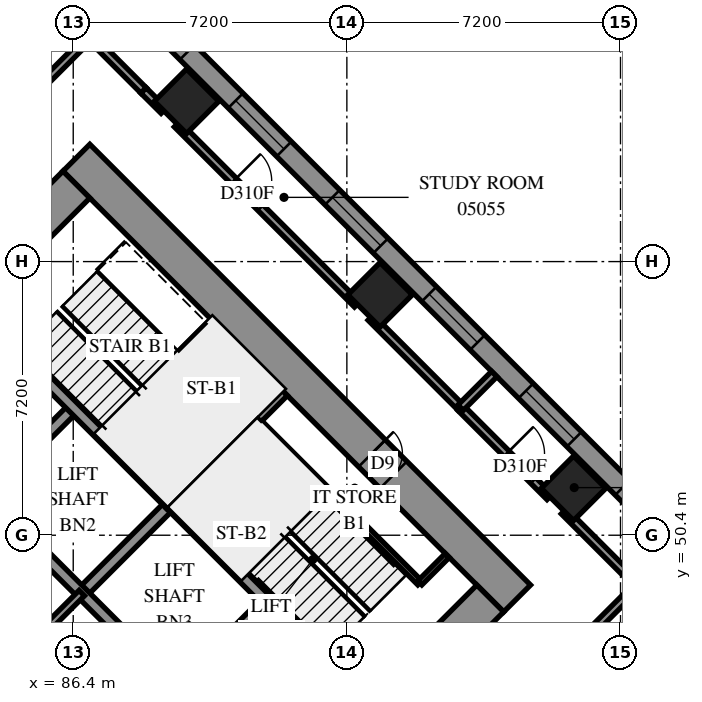
"""IFC4 building model, lengths in metres.
Left out: names, types, materials, properties, quantities, classifications, styles, units other than length and angle.
Written with IfcOpenShell. Run it as: python <this file> out.ifc"""

import sys

from ifc_helpers import new_model, si_unit, direction, frame, frame_2d, origin, origin_2d, place, context, subcontext, project, spatial, polyline, rectangle, outline, extrude, element, fill, save


model = new_model("IFC4")
c1 = context("Model", 3, precision=1e-05, world=origin(), true_north=direction((0.0, 1.0)))
c2 = subcontext(c1, "Body", "Model", "MODEL_VIEW")
j1 = project(units=[si_unit("LENGTHUNIT", "METRE"), si_unit("PLANEANGLEUNIT", "RADIAN")], contexts=[c1])
p1 = place(None, origin())
s1 = spatial("IfcSite", under=j1, at=p1, CompositionType="ELEMENT")
p2 = place(p1, origin())
s2 = spatial("IfcBuilding", under=s1, at=p2, CompositionType="ELEMENT")
p3 = place(p2, frame((0.0, 0.0, 22.8)))
s3 = spatial("IfcBuildingStorey", under=s2, at=p3, CompositionType="ELEMENT", Elevation=22.8)
for number, where, z_axis, x_axis in (
    (1, (89.382, 61.818, 0.0), (0.0, 0.0, 1.0), (0.707, -0.707, 0.0)),
    (2, (94.474, 56.727, 0.0), (0.0, 0.0, 1.0), (0.707, -0.707, 0.0)),
    (3, (99.565, 51.635, 0.0), (0.0, 0.0, 1.0), (0.707, -0.707, 0.0)),
):
    element("IfcColumn", number, at=place(p3, frame(where, z_axis=z_axis, x_axis=x_axis)), inside=s3, PredefinedType="COLUMN", context=c2, shape_type="SweptSolid", body=[
        extrude(rectangle(XDim=1.2, YDim=1.2, at=origin_2d()), origin(), (0.0, 0.0, 1.0), 3.9),
    ])
p4 = place(p3, frame((75.594, 49.443, -0.4), z_axis=(0.0, 0.0, 1.0), x_axis=(0.7071037324, -0.70710983, 0.0)))
e4 = element("IfcWall", 4, at=p4, inside=s3, PredefinedType="SHEAR", context=c2, shape_type="SweptSolid", body=[
    extrude(rectangle(XDim=16.4, YDim=1.0, at=frame_2d((8.2, 0.0))), origin(), (0.0, 0.0, 1.0), 3.6),
])
p5 = place(p3, frame((86.483, 60.333, -0.4), z_axis=(0.0, 0.0, 1.0), x_axis=(0.70710983, -0.7071037324, 0.0)))
e5 = element("IfcWall", 5, at=p5, inside=s3, PredefinedType="SHEAR", context=c2, shape_type="SweptSolid", body=[
    extrude(rectangle(XDim=16.4, YDim=1.0, at=frame_2d((8.2, 0.0))), origin(), (0.0, 0.0, 1.0), 3.6),
])
p6 = place(p5, frame((11.0, 0.0, 0.4)))
e6 = element("IfcOpeningElement", 6, at=p6, cuts=e5, PredefinedType="OPENING", context=c2, shape_type="SweptSolid", body=[
    extrude(rectangle(XDim=0.8, YDim=2.1, at=frame_2d((0.4, 1.05))), frame((0.0, 0.51, 0.0), z_axis=(0.0, -1.0, 0.0), x_axis=(1.0, 0.0, 0.0)), (0.0, 0.0, 1.0), 1.02),
])
p7 = place(p3, frame((76.301, 49.443, -0.4), z_axis=(0.0, 0.0, 1.0), x_axis=(0.7071067812, 0.7071067812, 0.0)))
e7 = element("IfcWall", 7, at=p7, inside=s3, PredefinedType="SHEAR", context=c2, shape_type="SweptSolid", body=[
    extrude(rectangle(XDim=14.4, YDim=1.0, at=frame_2d((7.2, 0.0))), origin(), (0.0, 0.0, 1.0), 3.6),
])
p8 = place(p7, frame((4.55, 0.0, 0.4)))
e8 = element("IfcOpeningElement", 8, at=p8, cuts=e7, PredefinedType="OPENING", context=c2, shape_type="SweptSolid", body=[
    extrude(rectangle(XDim=1.1, YDim=2.1, at=frame_2d((0.55, 1.05))), frame((0.0, 0.51, 0.0), z_axis=(0.0, -1.0, 0.0), x_axis=(1.0, 0.0, 0.0)), (0.0, 0.0, 1.0), 1.02),
])
p9 = place(p7, frame((11.35, 0.0, 0.4)))
e9 = element("IfcOpeningElement", 9, at=p9, cuts=e7, PredefinedType="OPENING", context=c2, shape_type="SweptSolid", body=[
    extrude(rectangle(XDim=1.1, YDim=2.1, at=frame_2d((0.55, 1.05))), frame((0.0, 0.51, 0.0), z_axis=(0.0, -1.0, 0.0), x_axis=(1.0, 0.0, 0.0)), (0.0, 0.0, 1.0), 1.02),
])
p10 = place(p3, frame((87.19, 38.554, -0.4), z_axis=(0.0, 0.0, 1.0), x_axis=(0.707103309, 0.7071102534, 0.0)))
e10 = element("IfcWall", 10, at=p10, inside=s3, PredefinedType="SHEAR", context=c2, shape_type="SweptSolid", body=[
    extrude(rectangle(XDim=14.4, YDim=1.0, at=frame_2d((7.2, 0.0))), origin(), (0.0, 0.0, 1.0), 3.6),
])
p11 = place(p10, frame((4.55, 0.0, 0.4)))
e11 = element("IfcOpeningElement", 11, at=p11, cuts=e10, PredefinedType="OPENING", context=c2, shape_type="SweptSolid", body=[
    extrude(rectangle(XDim=1.1, YDim=2.1, at=frame_2d((0.55, 1.05))), frame((0.0, 0.51, 0.0), z_axis=(0.0, -1.0, 0.0), x_axis=(1.0, 0.0, 0.0)), (0.0, 0.0, 1.0), 1.02),
])
p12 = place(p10, frame((11.35, 0.0, 0.4)))
e12 = element("IfcOpeningElement", 12, at=p12, cuts=e10, PredefinedType="OPENING", context=c2, shape_type="SweptSolid", body=[
    extrude(rectangle(XDim=1.1, YDim=2.1, at=frame_2d((0.55, 1.05))), frame((0.0, 0.51, 0.0), z_axis=(0.0, -1.0, 0.0), x_axis=(1.0, 0.0, 0.0)), (0.0, 0.0, 1.0), 1.02),
])
p13 = place(p3, frame((84.079, 51.423, 0.0), z_axis=(0.0, 0.0, 1.0), x_axis=(0.7071219326, 0.7070916295, 0.0)))
e13 = element("IfcWall", 13, at=p13, inside=s3, PredefinedType="SOLIDWALL", context=c2, shape_type="SweptSolid", body=[
    extrude(rectangle(XDim=3.3, YDim=0.3, at=frame_2d((1.65, 0.0))), origin(), (0.0, 0.0, 1.0), 3.9),
])
for number, where, z_axis, x_axis in (
    (14, (86.625, 48.878, 0.0), (0.0, 0.0, 1.0), (0.707, 0.707, 0.0)),
    (15, (89.17, 46.332, 0.0), (0.0, 0.0, 1.0), (0.707, 0.707, 0.0)),
):
    element("IfcWall", number, at=place(p3, frame(where, z_axis=z_axis, x_axis=x_axis)), inside=s3, PredefinedType="SOLIDWALL", context=c2, shape_type="SweptSolid", body=[
        extrude(rectangle(XDim=3.3, YDim=0.3, at=frame_2d((1.65, 0.0))), origin(), (0.0, 0.0, 1.0), 3.9),
    ])
p14 = place(p3, frame((78.988, 51.423, 0.0), z_axis=(0.0, 0.0, 1.0), x_axis=(0.7071067812, -0.7071067812, 0.0)))
e16 = element("IfcWall", 16, at=p14, inside=s3, PredefinedType="SOLIDWALL", context=c2, shape_type="SweptSolid", body=[
    extrude(rectangle(XDim=14.4, YDim=0.3, at=frame_2d((7.2, 0.0))), origin(), (0.0, 0.0, 1.0), 3.9),
])
p15 = place(p14, frame((1.25, 0.0, 0.0)))
e17 = element("IfcOpeningElement", 17, at=p15, cuts=e16, PredefinedType="OPENING", context=c2, shape_type="SweptSolid", body=[
    extrude(rectangle(XDim=1.1, YDim=2.1, at=frame_2d((0.55, 1.05))), frame((0.0, 0.16, 0.0), z_axis=(0.0, -1.0, 0.0), x_axis=(1.0, 0.0, 0.0)), (0.0, 0.0, 1.0), 0.32),
])
p16 = place(p14, frame((4.85, 0.0, 0.0)))
e18 = element("IfcOpeningElement", 18, at=p16, cuts=e16, PredefinedType="OPENING", context=c2, shape_type="SweptSolid", body=[
    extrude(rectangle(XDim=1.1, YDim=2.1, at=frame_2d((0.55, 1.05))), frame((0.0, 0.16, 0.0), z_axis=(0.0, -1.0, 0.0), x_axis=(1.0, 0.0, 0.0)), (0.0, 0.0, 1.0), 0.32),
])
p17 = place(p14, frame((8.45, 0.0, 0.0)))
e19 = element("IfcOpeningElement", 19, at=p17, cuts=e16, PredefinedType="OPENING", context=c2, shape_type="SweptSolid", body=[
    extrude(rectangle(XDim=1.1, YDim=2.1, at=frame_2d((0.55, 1.05))), frame((0.0, 0.16, 0.0), z_axis=(0.0, -1.0, 0.0), x_axis=(1.0, 0.0, 0.0)), (0.0, 0.0, 1.0), 0.32),
])
p18 = place(p14, frame((12.05, 0.0, 0.0)))
e20 = element("IfcOpeningElement", 20, at=p18, cuts=e16, PredefinedType="OPENING", context=c2, shape_type="SweptSolid", body=[
    extrude(rectangle(XDim=1.1, YDim=2.1, at=frame_2d((0.55, 1.05))), frame((0.0, 0.16, 0.0), z_axis=(0.0, -1.0, 0.0), x_axis=(1.0, 0.0, 0.0)), (0.0, 0.0, 1.0), 0.32),
])
p19 = place(p3, frame((81.534, 53.969, 0.0), z_axis=(0.0, 0.0, 1.0), x_axis=(0.707103309, -0.7071102534, 0.0)))
e21 = element("IfcWall", 21, at=p19, inside=s3, PredefinedType="SOLIDWALL", context=c2, shape_type="SweptSolid", body=[
    extrude(rectangle(XDim=14.4, YDim=0.3, at=frame_2d((7.2, 0.0))), origin(), (0.0, 0.0, 1.0), 3.9),
])
p20 = place(p19, frame((12.05, 0.0, 0.0)))
e22 = element("IfcOpeningElement", 22, at=p20, cuts=e21, PredefinedType="OPENING", context=c2, shape_type="SweptSolid", body=[
    extrude(rectangle(XDim=1.1, YDim=2.1, at=frame_2d((0.55, 1.05))), frame((0.0, 0.16, 0.0), z_axis=(0.0, -1.0, 0.0), x_axis=(1.0, 0.0, 0.0)), (0.0, 0.0, 1.0), 0.32),
])
for number, where, z_axis, x_axis in (
    (23, (83.867, 56.302, 0.0), (0.0, 0.0, 1.0), (0.707, -0.707, 0.0)),
    (24, (88.958, 51.211, 0.0), (0.0, 0.0, 1.0), (0.707, -0.707, 0.0)),
):
    element("IfcWall", number, at=place(p3, frame(where, z_axis=z_axis, x_axis=x_axis)), inside=s3, PredefinedType="SOLIDWALL", context=c2, shape_type="SweptSolid", body=[
        extrude(rectangle(XDim=7.2, YDim=0.3, at=frame_2d((3.6, 0.0))), origin(), (0.0, 0.0, 1.0), 3.9),
    ])
p21 = place(p3, frame((88.958, 51.211, 0.0), z_axis=(0.0, 0.0, 1.0), x_axis=(0.7071067812, 0.7071067812, 0.0)))
e25 = element("IfcWall", 25, at=p21, inside=s3, PredefinedType="SOLIDWALL", context=c2, shape_type="SweptSolid", body=[
    extrude(rectangle(XDim=4.2, YDim=0.3, at=frame_2d((2.1, 0.0))), origin(), (0.0, 0.0, 1.0), 3.9),
])
p22 = place(p3, frame((117.843, 34.665, 0.0), z_axis=(0.0, 0.0, 1.0), x_axis=(-0.7071067812, 0.7071067812, 0.0)))
e26 = element("IfcWall", 26, at=p22, inside=s3, PredefinedType="SOLIDWALL", context=c2, shape_type="SweptSolid", body=[
    extrude(outline(polyline([(-0.275, -0.275), (54.222, -0.275), (53.994, 0.275), (0.275, 0.275), (-0.275, -0.275)])), origin(), (0.0, 0.0, 1.0), 3.9),
])
p23 = place(p22, frame((0.8, 0.0, 0.7)))
e27 = element("IfcOpeningElement", 27, at=p23, cuts=e26, PredefinedType="OPENING", context=c2, shape_type="SweptSolid", body=[
    extrude(rectangle(XDim=1.8, YDim=2.4, at=frame_2d((0.9, 1.2))), frame((0.0, 0.285, 0.0), z_axis=(0.0, -1.0, 0.0), x_axis=(1.0, 0.0, 0.0)), (0.0, 0.0, 1.0), 0.57),
])
p24 = place(p22, frame((4.225, 0.0, 0.7)))
e28 = element("IfcOpeningElement", 28, at=p24, cuts=e26, PredefinedType="OPENING", context=c2, shape_type="SweptSolid", body=[
    extrude(rectangle(XDim=1.8, YDim=2.4, at=frame_2d((0.9, 1.2))), frame((0.0, 0.285, 0.0), z_axis=(0.0, -1.0, 0.0), x_axis=(1.0, 0.0, 0.0)), (0.0, 0.0, 1.0), 0.57),
])
p25 = place(p22, frame((7.825, 0.0, 0.7)))
e29 = element("IfcOpeningElement", 29, at=p25, cuts=e26, PredefinedType="OPENING", context=c2, shape_type="SweptSolid", body=[
    extrude(rectangle(XDim=1.8, YDim=2.4, at=frame_2d((0.9, 1.2))), frame((0.0, 0.285, 0.0), z_axis=(0.0, -1.0, 0.0), x_axis=(1.0, 0.0, 0.0)), (0.0, 0.0, 1.0), 0.57),
])
p26 = place(p22, frame((11.425, 0.0, 0.7)))
e30 = element("IfcOpeningElement", 30, at=p26, cuts=e26, PredefinedType="OPENING", context=c2, shape_type="SweptSolid", body=[
    extrude(rectangle(XDim=1.8, YDim=2.4, at=frame_2d((0.9, 1.2))), frame((0.0, 0.285, 0.0), z_axis=(0.0, -1.0, 0.0), x_axis=(1.0, 0.0, 0.0)), (0.0, 0.0, 1.0), 0.57),
])
p27 = place(p22, frame((15.025, 0.0, 0.7)))
e31 = element("IfcOpeningElement", 31, at=p27, cuts=e26, PredefinedType="OPENING", context=c2, shape_type="SweptSolid", body=[
    extrude(rectangle(XDim=1.8, YDim=2.4, at=frame_2d((0.9, 1.2))), frame((0.0, 0.285, 0.0), z_axis=(0.0, -1.0, 0.0), x_axis=(1.0, 0.0, 0.0)), (0.0, 0.0, 1.0), 0.57),
])
p28 = place(p22, frame((18.625, 0.0, 0.7)))
e32 = element("IfcOpeningElement", 32, at=p28, cuts=e26, PredefinedType="OPENING", context=c2, shape_type="SweptSolid", body=[
    extrude(rectangle(XDim=1.8, YDim=2.4, at=frame_2d((0.9, 1.2))), frame((0.0, 0.285, 0.0), z_axis=(0.0, -1.0, 0.0), x_axis=(1.0, 0.0, 0.0)), (0.0, 0.0, 1.0), 0.57),
])
p29 = place(p22, frame((22.225, 0.0, 0.7)))
e33 = element("IfcOpeningElement", 33, at=p29, cuts=e26, PredefinedType="OPENING", context=c2, shape_type="SweptSolid", body=[
    extrude(rectangle(XDim=1.8, YDim=2.4, at=frame_2d((0.9, 1.2))), frame((0.0, 0.285, 0.0), z_axis=(0.0, -1.0, 0.0), x_axis=(1.0, 0.0, 0.0)), (0.0, 0.0, 1.0), 0.57),
])
p30 = place(p22, frame((25.825, 0.0, 0.7)))
e34 = element("IfcOpeningElement", 34, at=p30, cuts=e26, PredefinedType="OPENING", context=c2, shape_type="SweptSolid", body=[
    extrude(rectangle(XDim=1.8, YDim=2.4, at=frame_2d((0.9, 1.2))), frame((0.0, 0.285, 0.0), z_axis=(0.0, -1.0, 0.0), x_axis=(1.0, 0.0, 0.0)), (0.0, 0.0, 1.0), 0.57),
])
p31 = place(p22, frame((29.425, 0.0, 0.7)))
e35 = element("IfcOpeningElement", 35, at=p31, cuts=e26, PredefinedType="OPENING", context=c2, shape_type="SweptSolid", body=[
    extrude(rectangle(XDim=1.8, YDim=2.4, at=frame_2d((0.9, 1.2))), frame((0.0, 0.285, 0.0), z_axis=(0.0, -1.0, 0.0), x_axis=(1.0, 0.0, 0.0)), (0.0, 0.0, 1.0), 0.57),
])
p32 = place(p22, frame((33.025, 0.0, 0.7)))
e36 = element("IfcOpeningElement", 36, at=p32, cuts=e26, PredefinedType="OPENING", context=c2, shape_type="SweptSolid", body=[
    extrude(rectangle(XDim=1.8, YDim=2.4, at=frame_2d((0.9, 1.2))), frame((0.0, 0.285, 0.0), z_axis=(0.0, -1.0, 0.0), x_axis=(1.0, 0.0, 0.0)), (0.0, 0.0, 1.0), 0.57),
])
p33 = place(p22, frame((36.625, 0.0, 0.7)))
e37 = element("IfcOpeningElement", 37, at=p33, cuts=e26, PredefinedType="OPENING", context=c2, shape_type="SweptSolid", body=[
    extrude(rectangle(XDim=1.8, YDim=2.4, at=frame_2d((0.9, 1.2))), frame((0.0, 0.285, 0.0), z_axis=(0.0, -1.0, 0.0), x_axis=(1.0, 0.0, 0.0)), (0.0, 0.0, 1.0), 0.57),
])
p34 = place(p22, frame((40.225, 0.0, 0.7)))
e38 = element("IfcOpeningElement", 38, at=p34, cuts=e26, PredefinedType="OPENING", context=c2, shape_type="SweptSolid", body=[
    extrude(rectangle(XDim=1.8, YDim=2.4, at=frame_2d((0.9, 1.2))), frame((0.0, 0.285, 0.0), z_axis=(0.0, -1.0, 0.0), x_axis=(1.0, 0.0, 0.0)), (0.0, 0.0, 1.0), 0.57),
])
p35 = place(p22, frame((43.825, 0.0, 0.7)))
e39 = element("IfcOpeningElement", 39, at=p35, cuts=e26, PredefinedType="OPENING", context=c2, shape_type="SweptSolid", body=[
    extrude(rectangle(XDim=1.8, YDim=2.4, at=frame_2d((0.9, 1.2))), frame((0.0, 0.285, 0.0), z_axis=(0.0, -1.0, 0.0), x_axis=(1.0, 0.0, 0.0)), (0.0, 0.0, 1.0), 0.57),
])
p36 = place(p22, frame((47.425, 0.0, 0.7)))
e40 = element("IfcOpeningElement", 40, at=p36, cuts=e26, PredefinedType="OPENING", context=c2, shape_type="SweptSolid", body=[
    extrude(rectangle(XDim=1.8, YDim=2.4, at=frame_2d((0.9, 1.2))), frame((0.0, 0.285, 0.0), z_axis=(0.0, -1.0, 0.0), x_axis=(1.0, 0.0, 0.0)), (0.0, 0.0, 1.0), 0.57),
])
p37 = place(p22, frame((51.06, 0.0, 0.7)))
e41 = element("IfcOpeningElement", 41, at=p37, cuts=e26, PredefinedType="OPENING", context=c2, shape_type="SweptSolid", body=[
    extrude(rectangle(XDim=1.8, YDim=2.4, at=frame_2d((0.9, 1.2))), frame((0.0, 0.285, 0.0), z_axis=(0.0, -1.0, 0.0), x_axis=(1.0, 0.0, 0.0)), (0.0, 0.0, 1.0), 0.57),
])
p38 = place(p3, frame((91.313, 53.354, 0.0), z_axis=(0.0, 0.0, 1.0), x_axis=(0.7071067812, -0.7071067812, 0.0)))
e42 = element("IfcWall", 42, at=p38, inside=s3, PredefinedType="PARTITIONING", context=c2, shape_type="SweptSolid", body=[
    extrude(rectangle(XDim=5.95, YDim=0.15, at=frame_2d((2.975, 0.0))), origin(), (0.0, 0.0, 1.0), 3.9),
])
p39 = place(p3, frame((95.52, 49.146, 0.0), z_axis=(0.0, 0.0, 1.0), x_axis=(0.7071067812, 0.7071067812, 0.0)))
e43 = element("IfcWall", 43, at=p39, inside=s3, PredefinedType="PARTITIONING", context=c2, shape_type="SweptSolid", body=[
    extrude(rectangle(XDim=1.02, YDim=0.15, at=frame_2d((0.51, 0.0))), origin(), (0.0, 0.0, 1.0), 3.9),
])
p40 = place(p3, frame((84.079, 46.332, 0.0), z_axis=(0.0, 0.0, 1.0), x_axis=(0.7071067812, 0.7071067812, 0.0)))
e44 = element("IfcWall", 44, at=p40, inside=s3, PredefinedType="PARTITIONING", context=c2, shape_type="SweptSolid", body=[
    extrude(rectangle(XDim=3.6, YDim=0.2, at=frame_2d((1.8, 0.0))), origin(), (0.0, 0.0, 1.0), 3.9),
])
p41 = place(p3, frame((95.179, 42.161, 0.0), z_axis=(0.0, 0.0, 1.0), x_axis=(0.7071115656, 0.7071019967, 0.0)))
e45 = element("IfcWall", 45, at=p41, inside=s3, PredefinedType="PARTITIONING", context=c2, shape_type="SweptSolid", body=[
    extrude(rectangle(XDim=10.45, YDim=0.2, at=frame_2d((5.225, 0.0))), origin(), (0.0, 0.0, 1.0), 3.9),
])
p42 = place(p3, frame((94.757, 42.587, 0.0), z_axis=(0.0, 0.0, 1.0), x_axis=(0.7071067812, 0.7071067812, 0.0)))
e46 = element("IfcWall", 46, at=p42, inside=s3, PredefinedType="PARTITIONING", context=c2, shape_type="SweptSolid", body=[
    extrude(rectangle(XDim=9.198, YDim=0.2, at=frame_2d((4.599, 0.0))), origin(), (0.0, 0.0, 1.0), 3.9),
])
p43 = place(p3, frame((81.049, 58.577, 0.0), z_axis=(0.0, 0.0, 1.0), x_axis=(0.7071124411, 0.7071011213, 0.0)))
e47 = element("IfcWall", 47, at=p43, inside=s3, PredefinedType="PARTITIONING", context=c2, shape_type="SweptSolid", body=[
    extrude(rectangle(XDim=8.834, YDim=0.2, at=frame_2d((4.417, 0.0))), origin(), (0.0, 0.0, 1.0), 3.9),
])
p44 = place(p3, frame((81.051, 57.731, 0.0), z_axis=(0.0, 0.0, 1.0), x_axis=(0.7071067812, 0.7071067812, 0.0)))
e48 = element("IfcWall", 48, at=p44, inside=s3, PredefinedType="PARTITIONING", context=c2, shape_type="SweptSolid", body=[
    extrude(rectangle(XDim=8.18, YDim=0.2, at=frame_2d((4.09, 0.0))), origin(), (0.0, 0.0, 1.0), 3.9),
])
p45 = place(p3, frame((89.13, 61.215, 0.0), z_axis=(0.0, 0.0, 1.0), x_axis=(0.7071067812, -0.7071067812, 0.0)))
e49 = element("IfcWall", 49, at=p45, inside=s3, PredefinedType="PARTITIONING", context=c2, shape_type="SweptSolid", body=[
    extrude(rectangle(XDim=6.703, YDim=0.2, at=frame_2d((3.352, 0.0))), origin(), (0.0, 0.0, 1.0), 3.9),
])
p46 = place(p45, frame((2.11, 0.0, 0.0)))
e50 = element("IfcOpeningElement", 50, at=p46, cuts=e49, PredefinedType="OPENING", context=c2, shape_type="SweptSolid", body=[
    extrude(rectangle(XDim=1.0, YDim=2.1, at=frame_2d((0.5, 1.05))), frame((0.0, 0.11, 0.0), z_axis=(0.0, -1.0, 0.0), x_axis=(1.0, 0.0, 0.0)), (0.0, 0.0, 1.0), 0.22),
])
p47 = place(p3, frame((94.229, 56.129, 0.0), z_axis=(0.0, 0.0, 1.0), x_axis=(0.706808235, -0.7074052014, 0.0)))
e51 = element("IfcWall", 51, at=p47, inside=s3, PredefinedType="PARTITIONING", context=c2, shape_type="SweptSolid", body=[
    extrude(rectangle(XDim=3.35, YDim=0.2, at=frame_2d((1.675, 0.0))), origin(), (0.0, 0.0, 1.0), 3.9),
])
p48 = place(p3, frame((96.591, 53.754, 0.0), z_axis=(0.0, 0.0, 1.0), x_axis=(0.7071067812, -0.7071067812, 0.0)))
e52 = element("IfcWall", 52, at=p48, inside=s3, PredefinedType="PARTITIONING", context=c2, shape_type="SweptSolid", body=[
    extrude(rectangle(XDim=3.318, YDim=0.2, at=frame_2d((1.659, 0.0))), origin(), (0.0, 0.0, 1.0), 3.9),
])
p49 = place(p48, frame((1.71, 0.0, 0.0)))
e53 = element("IfcOpeningElement", 53, at=p49, cuts=e52, PredefinedType="OPENING", context=c2, shape_type="SweptSolid", body=[
    extrude(rectangle(XDim=1.0, YDim=2.1, at=frame_2d((0.5, 1.05))), frame((0.0, 0.11, 0.0), z_axis=(0.0, -1.0, 0.0), x_axis=(1.0, 0.0, 0.0)), (0.0, 0.0, 1.0), 0.22),
])
p50 = place(p3, frame((99.312, 51.032, 0.0), z_axis=(0.0, 0.0, 1.0), x_axis=(0.7071067812, -0.7071067812, 0.0)))
e54 = element("IfcWall", 54, at=p50, inside=s3, PredefinedType="PARTITIONING", context=c2, shape_type="SweptSolid", body=[
    extrude(rectangle(XDim=2.752, YDim=0.2, at=frame_2d((1.376, 0.0))), origin(), (0.0, 0.0, 1.0), 3.9),
])
p51 = place(p3, frame((86.84, 63.516, 0.0), z_axis=(0.0, 0.0, 1.0), x_axis=(0.7066061748, -0.7076070334, 0.0)))
e55 = element("IfcWall", 55, at=p51, inside=s3, PredefinedType="PARTITIONING", context=c2, shape_type="SweptSolid", body=[
    extrude(rectangle(XDim=1.998, YDim=0.2, at=frame_2d((0.999, 0.0))), origin(), (0.0, 0.0, 1.0), 3.9),
])
p52 = place(p3, frame((96.593, 53.757, 0.0), z_axis=(0.0, 0.0, 1.0), x_axis=(0.7070668147, 0.7071467454, 0.0)))
e56 = element("IfcWall", 56, at=p52, inside=s3, PredefinedType="PARTITIONING", context=c2, shape_type="SweptSolid", body=[
    extrude(rectangle(XDim=1.251, YDim=0.2, at=frame_2d((0.626, 0.0))), origin(), (0.0, 0.0, 1.0), 3.9),
])
p53 = place(p3, frame((88.251, 62.101, 0.0), z_axis=(0.0, 0.0, 1.0), x_axis=(0.7084371761, -0.7057738785, 0.0)))
e57 = element("IfcWall", 57, at=p53, inside=s3, PredefinedType="PARTITIONING", context=c2, shape_type="SweptSolid", body=[
    extrude(rectangle(XDim=0.751, YDim=0.2, at=frame_2d((0.376, 0.0))), origin(), (0.0, 0.0, 1.0), 3.9),
])
p54 = place(p29, origin())
e58 = element("IfcWindow", 58, at=p54, inside=s3, PartitioningType="SINGLE_PANEL", PredefinedType="WINDOW", context=c2, shape_type="SweptSolid", body=[
    extrude(rectangle(XDim=1.8, YDim=2.4, at=frame_2d((0.9, 1.2))), frame((0.0, 0.155, 0.0), z_axis=(0.0, -1.0, 0.0), x_axis=(1.0, 0.0, 0.0)), (0.0, 0.0, 1.0), 0.06),
])
fill(e33, e58)
p55 = place(p30, origin())
e59 = element("IfcWindow", 59, at=p55, inside=s3, PartitioningType="SINGLE_PANEL", PredefinedType="WINDOW", context=c2, shape_type="SweptSolid", body=[
    extrude(rectangle(XDim=1.8, YDim=2.4, at=frame_2d((0.9, 1.2))), frame((0.0, 0.155, 0.0), z_axis=(0.0, -1.0, 0.0), x_axis=(1.0, 0.0, 0.0)), (0.0, 0.0, 1.0), 0.06),
])
fill(e34, e59)
p56 = place(p31, origin())
e60 = element("IfcWindow", 60, at=p56, inside=s3, PartitioningType="SINGLE_PANEL", PredefinedType="WINDOW", context=c2, shape_type="SweptSolid", body=[
    extrude(rectangle(XDim=1.8, YDim=2.4, at=frame_2d((0.9, 1.2))), frame((0.0, 0.155, 0.0), z_axis=(0.0, -1.0, 0.0), x_axis=(1.0, 0.0, 0.0)), (0.0, 0.0, 1.0), 0.06),
])
fill(e35, e60)
p57 = place(p32, origin())
e61 = element("IfcWindow", 61, at=p57, inside=s3, PartitioningType="SINGLE_PANEL", PredefinedType="WINDOW", context=c2, shape_type="SweptSolid", body=[
    extrude(rectangle(XDim=1.8, YDim=2.4, at=frame_2d((0.9, 1.2))), frame((0.0, 0.155, 0.0), z_axis=(0.0, -1.0, 0.0), x_axis=(1.0, 0.0, 0.0)), (0.0, 0.0, 1.0), 0.06),
])
fill(e36, e61)
p58 = place(p33, origin())
e62 = element("IfcWindow", 62, at=p58, inside=s3, PartitioningType="SINGLE_PANEL", PredefinedType="WINDOW", context=c2, shape_type="SweptSolid", body=[
    extrude(rectangle(XDim=1.8, YDim=2.4, at=frame_2d((0.9, 1.2))), frame((0.0, 0.155, 0.0), z_axis=(0.0, -1.0, 0.0), x_axis=(1.0, 0.0, 0.0)), (0.0, 0.0, 1.0), 0.06),
])
fill(e37, e62)
p59 = place(p34, origin())
e63 = element("IfcWindow", 63, at=p59, inside=s3, PartitioningType="SINGLE_PANEL", PredefinedType="WINDOW", context=c2, shape_type="SweptSolid", body=[
    extrude(rectangle(XDim=1.8, YDim=2.4, at=frame_2d((0.9, 1.2))), frame((0.0, 0.155, 0.0), z_axis=(0.0, -1.0, 0.0), x_axis=(1.0, 0.0, 0.0)), (0.0, 0.0, 1.0), 0.06),
])
fill(e38, e63)
p60 = place(p6, origin())
e64 = element("IfcDoor", 64, at=p60, inside=s3, OperationType="SINGLE_SWING_RIGHT", PredefinedType="DOOR", context=c2, shape_type="SweptSolid", body=[
    extrude(rectangle(XDim=0.8, YDim=2.1, at=frame_2d((0.4, 1.05))), frame((0.0, -0.44, 0.0), z_axis=(0.0, -1.0, 0.0), x_axis=(1.0, 0.0, 0.0)), (0.0, 0.0, 1.0), 0.05),
])
fill(e6, e64)
p61 = place(p46, origin())
e65 = element("IfcDoor", 65, at=p61, inside=s3, OperationType="SINGLE_SWING_RIGHT", PredefinedType="DOOR", context=c2, shape_type="SweptSolid", body=[
    extrude(rectangle(XDim=1.0, YDim=2.1, at=frame_2d((0.5, 1.05))), frame((0.0, 0.025, 0.0), z_axis=(0.0, -1.0, 0.0), x_axis=(1.0, 0.0, 0.0)), (0.0, 0.0, 1.0), 0.05),
])
fill(e50, e65)
p62 = place(p49, origin())
e66 = element("IfcDoor", 66, at=p62, inside=s3, OperationType="SINGLE_SWING_RIGHT", PredefinedType="DOOR", context=c2, shape_type="SweptSolid", body=[
    extrude(rectangle(XDim=1.0, YDim=2.1, at=frame_2d((0.5, 1.05))), frame((0.0, 0.025, 0.0), z_axis=(0.0, -1.0, 0.0), x_axis=(1.0, 0.0, 0.0)), (0.0, 0.0, 1.0), 0.05),
])
fill(e53, e66)
save(model, sys.argv[1])
